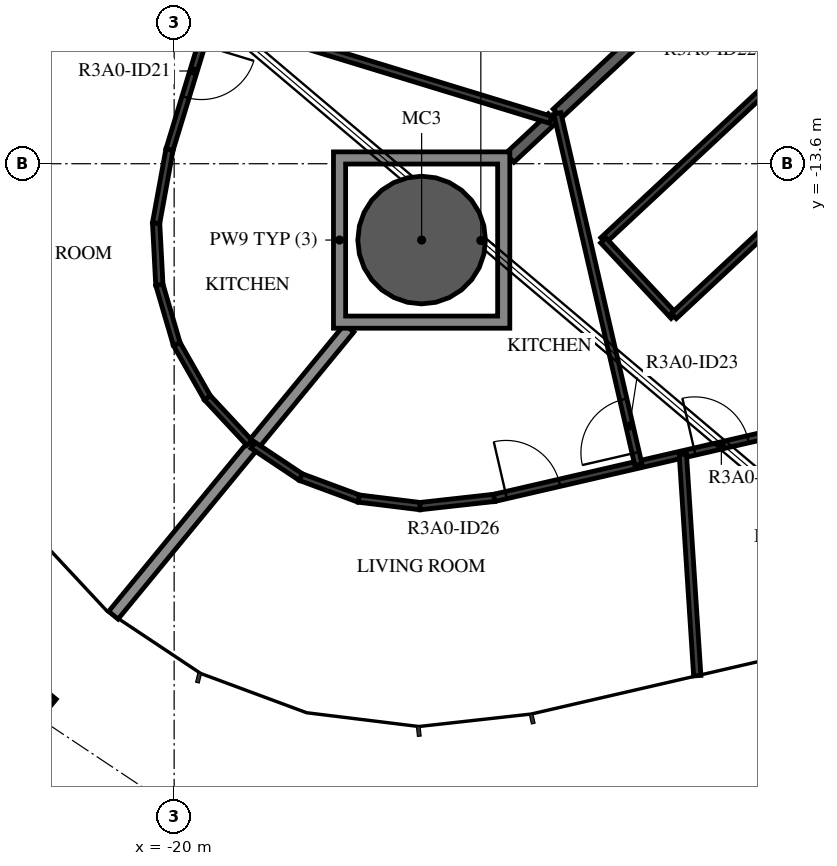
"""IFC4 building model, lengths in metres.
Left out: names, types, materials, properties, quantities, classifications, styles, units other than length and angle.
Written with IfcOpenShell. Run it as: python <this file> out.ifc"""

import sys

from ifc_helpers import new_model, si_unit, direction, frame, frame_2d, origin, origin_2d, place, context, subcontext, project, spatial, polyline, rectangle, hollow_circle, i_section, outline, extrude, element, fill, save


model = new_model("IFC4")
c1 = context("Model", 3, precision=1e-05, world=origin(), true_north=direction((0.0, 1.0)))
c2 = subcontext(c1, "Body", "Model", "MODEL_VIEW")
j1 = project(units=[si_unit("LENGTHUNIT", "METRE"), si_unit("PLANEANGLEUNIT", "RADIAN")], contexts=[c1])
p1 = place(None, origin())
s1 = spatial("IfcSite", under=j1, at=p1, CompositionType="ELEMENT")
p2 = place(p1, origin())
s2 = spatial("IfcBuilding", under=s1, at=p2, CompositionType="ELEMENT")
p3 = place(p2, frame((0.0, 0.0, 120.4)))
s3 = spatial("IfcBuildingStorey", under=s2, at=p3, CompositionType="ELEMENT", Elevation=120.4)
p4 = place(p3, frame((-15.93, -14.855, -0.38), z_axis=(0.0, 0.0, 1.0), x_axis=(1.0, 0.0, 0.0)))
e1 = element("IfcColumn", 1, at=p4, inside=s3, PredefinedType="COLUMN", context=c2, shape_type="SweptSolid", body=[
    extrude(hollow_circle(Radius=1.05, WallThickness=0.05, at=origin_2d()), origin(), (0.0, 0.0, 1.0), 3.5),
])
p5 = place(p3, frame((-22.342, -22.659, -0.38), z_axis=(0.0, 0.0, 1.0), x_axis=(-0.772637925649, 0.634846938915, 0.0)))
e2 = element("IfcColumn", 2, at=p5, inside=s3, PredefinedType="COLUMN", context=c2, shape_type="SweptSolid", body=[
    extrude(i_section(OverallWidth=0.3, OverallDepth=0.9, WebThickness=0.019, FlangeThickness=0.035, FilletRadius=0.03, at=origin_2d()), origin(), (0.0, 0.0, 1.0), 3.5),
])
p6 = place(p3, frame((-12.523, -6.659, 0.0), z_axis=(0.0, 0.0, 1.0), x_axis=(0.682001841105, -0.731350455479, 0.0)))
e3 = element("IfcWall", 3, at=p6, inside=s3, PredefinedType="STANDARD", context=c2, shape_type="SweptSolid", body=[
    extrude(rectangle(XDim=7.342, YDim=0.2, at=frame_2d((3.671, 0.0))), origin(), (0.0, 0.0, 1.0), 3.12),
])
p7 = place(p3, frame((-13.699, -12.774, 0.0), z_axis=(0.0, 0.0, 1.0), x_axis=(0.731353758457, 0.681998299111, 0.0)))
e4 = element("IfcWall", 4, at=p7, inside=s3, PredefinedType="STANDARD", context=c2, shape_type="SweptSolid", body=[
    extrude(rectangle(XDim=5.031, YDim=0.2, at=frame_2d((2.515, 0.0))), origin(), (0.0, 0.0, 1.0), 3.12),
])
p8 = place(p3, frame((-21.0, -21.025, 0.0), z_axis=(0.0, 0.0, 1.0), x_axis=(0.634846795952, 0.772638043116, 0.0)))
e5 = element("IfcWall", 5, at=p8, inside=s3, PredefinedType="STANDARD", context=c2, shape_type="SweptSolid", body=[
    extrude(rectangle(XDim=6.109, YDim=0.2, at=frame_2d((3.055, 0.0))), origin(), (0.0, 0.0, 1.0), 2.73),
])
p9 = place(p3, frame((-14.48, -13.503, 0.0), z_axis=(0.0, 0.0, 1.0), x_axis=(0.73152991834, 0.681809341806, 0.0)))
e6 = element("IfcWall", 6, at=p9, inside=s3, PredefinedType="STANDARD", context=c2, shape_type="SweptSolid", body=[
    extrude(rectangle(XDim=0.958, YDim=0.2, at=frame_2d((0.479, 0.0))), origin(), (0.0, 0.0, 1.0), 3.12),
])
p10 = place(p3, frame((-16.579, -1.928, 0.0), z_axis=(0.0, 0.0, 1.0), x_axis=(-0.29236733738, -0.956306091183, 0.0)))
e7 = element("IfcWall", 7, at=p10, inside=s3, PredefinedType="PARTITIONING", context=c2, shape_type="SweptSolid", body=[
    extrude(rectangle(XDim=11.963, YDim=0.12, at=frame_2d((5.981, 0.0))), origin(), (0.0, 0.0, 1.0), 3.12),
])
p11 = place(p10, frame((3.271, 0.0, 0.0)))
e8 = element("IfcOpeningElement", 8, at=p11, cuts=e7, PredefinedType="OPENING", context=c2, shape_type="SweptSolid", body=[
    extrude(rectangle(XDim=0.9, YDim=2.1, at=frame_2d((0.45, 1.05))), frame((0.0, 0.07, 0.0), z_axis=(0.0, -1.0, 0.0), x_axis=(1.0, 0.0, 0.0)), (0.0, 0.0, 1.0), 0.14),
])
p12 = place(p10, frame((8.229, 0.0, 0.0)))
e9 = element("IfcOpeningElement", 9, at=p12, cuts=e7, PredefinedType="OPENING", context=c2, shape_type="SweptSolid", body=[
    extrude(rectangle(XDim=0.9, YDim=2.1, at=frame_2d((0.45, 1.05))), frame((0.0, 0.07, 0.0), z_axis=(0.0, -1.0, 0.0), x_axis=(1.0, 0.0, 0.0)), (0.0, 0.0, 1.0), 0.14),
])
p13 = place(p10, frame((10.161, 0.0, 0.0)))
e10 = element("IfcOpeningElement", 10, at=p13, cuts=e7, PredefinedType="OPENING", context=c2, shape_type="SweptSolid", body=[
    extrude(rectangle(XDim=0.9, YDim=2.1, at=frame_2d((0.45, 1.05))), frame((0.0, 0.07, 0.0), z_axis=(0.0, -1.0, 0.0), x_axis=(1.0, 0.0, 0.0)), (0.0, 0.0, 1.0), 0.14),
])
p14 = place(p3, frame((-19.404, -11.167, 0.0), z_axis=(0.0, 0.0, 1.0), x_axis=(0.956314306829, -0.292340463423, 0.0)))
e11 = element("IfcWall", 11, at=p14, inside=s3, PredefinedType="PARTITIONING", context=c2, shape_type="SweptSolid", body=[
    extrude(rectangle(XDim=5.85, YDim=0.12, at=frame_2d((2.925, 0.0))), origin(), (0.0, 0.0, 1.0), 3.12),
])
p15 = place(p14, frame((0.3, 0.0, 0.0)))
e12 = element("IfcOpeningElement", 12, at=p15, cuts=e11, PredefinedType="OPENING", context=c2, shape_type="SweptSolid", body=[
    extrude(rectangle(XDim=0.9, YDim=2.1, at=frame_2d((0.45, 1.05))), frame((0.0, 0.07, 0.0), z_axis=(0.0, -1.0, 0.0), x_axis=(1.0, 0.0, 0.0)), (0.0, 0.0, 1.0), 0.14),
])
for number, where, z_axis, x_axis in (
    (13, (-18.762, -18.19, 0.0), (0.0, 0.0, 1.0), (-0.682, 0.731, 0.0)),
    (14, (-19.455, -17.448, 0.0), (0.0, 0.0, 1.0), (-0.495, 0.869, 0.0)),
    (15, (-19.958, -16.565, 0.0), (0.0, 0.0, 1.0), (-0.281, 0.96, 0.0)),
):
    element("IfcWall", number, at=place(p3, frame(where, z_axis=z_axis, x_axis=x_axis)), inside=s3, PredefinedType="PARTITIONING", context=c2, shape_type="SweptSolid", body=[
        extrude(rectangle(XDim=1.016, YDim=0.12, at=frame_2d((0.508, 0.0))), origin(), (0.0, 0.0, 1.0), 3.12),
    ])
p16 = place(p3, frame((-20.244, -15.59, 0.0), z_axis=(0.0, 0.0, 1.0), x_axis=(-0.052142637988, 0.998639647372, 0.0)))
e16 = element("IfcWall", 16, at=p16, inside=s3, PredefinedType="PARTITIONING", context=c2, shape_type="SweptSolid", body=[
    extrude(rectangle(XDim=1.016, YDim=0.12, at=frame_2d((0.508, 0.0))), origin(), (0.0, 0.0, 1.0), 3.12),
])
p17 = place(p3, frame((-20.297, -14.575, 0.0), z_axis=(0.0, 0.0, 1.0), x_axis=(0.179288174895, 0.983796600087, 0.0)))
e17 = element("IfcWall", 17, at=p17, inside=s3, PredefinedType="PARTITIONING", context=c2, shape_type="SweptSolid", body=[
    extrude(rectangle(XDim=1.227, YDim=0.12, at=frame_2d((0.613, 0.0))), origin(), (0.0, 0.0, 1.0), 3.12),
])
p18 = place(p3, frame((-11.117, -10.366, 0.0), z_axis=(0.0, 0.0, 1.0), x_axis=(0.682041233274, -0.731313719353, 0.0)))
e18 = element("IfcWall", 18, at=p18, inside=s3, PredefinedType="PARTITIONING", context=c2, shape_type="SweptSolid", body=[
    extrude(rectangle(XDim=2.042, YDim=0.12, at=frame_2d((1.021, 0.0))), origin(), (0.0, 0.0, 1.0), 3.12),
])
p19 = place(p18, frame((0.2, 0.0, 0.0)))
e19 = element("IfcOpeningElement", 19, at=p19, cuts=e18, PredefinedType="OPENING", context=c2, shape_type="SweptSolid", body=[
    extrude(rectangle(XDim=0.9, YDim=2.1, at=frame_2d((0.45, 1.05))), frame((0.0, 0.07, 0.0), z_axis=(0.0, -1.0, 0.0), x_axis=(1.0, 0.0, 0.0)), (0.0, 0.0, 1.0), 0.14),
])
p20 = place(p3, frame((-9.724, -11.859, 0.0), z_axis=(0.0, 0.0, 1.0), x_axis=(-0.731365154613, -0.681986078023, 0.0)))
e20 = element("IfcWall", 20, at=p20, inside=s3, PredefinedType="PARTITIONING", context=c2, shape_type="SweptSolid", body=[
    extrude(rectangle(XDim=4.4, YDim=0.12, at=frame_2d((2.2, 0.0))), origin(), (0.0, 0.0, 1.0), 3.12),
])
p21 = place(p3, frame((-12.943, -14.86, 0.0), z_axis=(0.0, 0.0, 1.0), x_axis=(0.682046998737, -0.731308342297, 0.0)))
e21 = element("IfcWall", 21, at=p21, inside=s3, PredefinedType="PARTITIONING", context=c2, shape_type="SweptSolid", body=[
    extrude(rectangle(XDim=1.7, YDim=0.12, at=frame_2d((0.85, 0.0))), origin(), (0.0, 0.0, 1.0), 3.12),
])
p22 = place(p3, frame((-11.783, -16.104, 0.0), z_axis=(0.0, 0.0, 1.0), x_axis=(0.731365154613, 0.681986078023, 0.0)))
e22 = element("IfcWall", 22, at=p22, inside=s3, PredefinedType="PARTITIONING", context=c2, shape_type="SweptSolid", body=[
    extrude(rectangle(XDim=4.4, YDim=0.12, at=frame_2d((2.2, 0.0))), origin(), (0.0, 0.0, 1.0), 3.12),
])
p23 = place(p3, frame((-18.703, -18.23, 0.0), z_axis=(0.0, 0.0, 1.0), x_axis=(0.832328473933, -0.554282699965, 0.0)))
e23 = element("IfcWall", 23, at=p23, inside=s3, PredefinedType="PARTITIONING", context=c2, shape_type="SweptSolid", body=[
    extrude(rectangle(XDim=0.945, YDim=0.12, at=frame_2d((0.472, 0.0))), origin(), (0.0, 0.0, 1.0), 3.12),
])
p24 = place(p3, frame((-17.917, -18.754, 0.0), z_axis=(0.0, 0.0, 1.0), x_axis=(0.937684971769, -0.347486537462, 0.0)))
e24 = element("IfcWall", 24, at=p24, inside=s3, PredefinedType="PARTITIONING", context=c2, shape_type="SweptSolid", body=[
    extrude(rectangle(XDim=1.016, YDim=0.12, at=frame_2d((0.508, 0.0))), origin(), (0.0, 0.0, 1.0), 3.12),
])
p25 = place(p3, frame((-16.964, -19.107, 0.0), z_axis=(0.0, 0.0, 1.0), x_axis=(0.992523553766, -0.122053247474, 0.0)))
e25 = element("IfcWall", 25, at=p25, inside=s3, PredefinedType="PARTITIONING", context=c2, shape_type="SweptSolid", body=[
    extrude(rectangle(XDim=1.016, YDim=0.12, at=frame_2d((0.508, 0.0))), origin(), (0.0, 0.0, 1.0), 3.12),
])
p26 = place(p3, frame((-15.956, -19.231, 0.0), z_axis=(0.0, 0.0, 1.0), x_axis=(0.993883734674, 0.110431526075, 0.0)))
e26 = element("IfcWall", 26, at=p26, inside=s3, PredefinedType="PARTITIONING", context=c2, shape_type="SweptSolid", body=[
    extrude(rectangle(XDim=1.227, YDim=0.12, at=frame_2d((0.614, 0.0))), origin(), (0.0, 0.0, 1.0), 3.12),
])
p27 = place(p3, frame((-14.736, -19.095, 0.0), z_axis=(0.0, 0.0, 1.0), x_axis=(0.974369132722, 0.224955091516, 0.0)))
e27 = element("IfcWall", 27, at=p27, inside=s3, PredefinedType="PARTITIONING", context=c2, shape_type="SweptSolid", body=[
    extrude(rectangle(XDim=18.654, YDim=0.12, at=frame_2d((9.327, 0.0))), origin(), (0.0, 0.0, 1.0), 3.12),
])
p28 = place(p27, frame((3.383, 0.0, 0.0)))
e28 = element("IfcOpeningElement", 28, at=p28, cuts=e27, PredefinedType="OPENING", context=c2, shape_type="SweptSolid", body=[
    extrude(rectangle(XDim=0.9, YDim=2.1, at=frame_2d((0.45, 1.05))), frame((0.0, 0.07, 0.0), z_axis=(0.0, -1.0, 0.0), x_axis=(1.0, 0.0, 0.0)), (0.0, 0.0, 1.0), 0.14),
])
p29 = place(p27, frame((6.81, 0.0, 0.0)))
e29 = element("IfcOpeningElement", 29, at=p29, cuts=e27, PredefinedType="OPENING", context=c2, shape_type="SweptSolid", body=[
    extrude(rectangle(XDim=0.9, YDim=2.1, at=frame_2d((0.45, 1.05))), frame((0.0, 0.07, 0.0), z_axis=(0.0, -1.0, 0.0), x_axis=(1.0, 0.0, 0.0)), (0.0, 0.0, 1.0), 0.14),
])
p30 = place(p27, frame((0.2, 0.0, 0.0)))
e30 = element("IfcOpeningElement", 30, at=p30, cuts=e27, PredefinedType="OPENING", context=c2, shape_type="SweptSolid", body=[
    extrude(rectangle(XDim=0.9, YDim=2.1, at=frame_2d((0.45, 1.05))), frame((0.0, 0.07, 0.0), z_axis=(0.0, -1.0, 0.0), x_axis=(1.0, 0.0, 0.0)), (0.0, 0.0, 1.0), 0.14),
])
p31 = place(p27, frame((14.839, 0.0, 0.0)))
e31 = element("IfcOpeningElement", 31, at=p31, cuts=e27, PredefinedType="OPENING", context=c2, shape_type="SweptSolid", body=[
    extrude(rectangle(XDim=0.9, YDim=2.1, at=frame_2d((0.45, 1.05))), frame((0.0, 0.07, 0.0), z_axis=(0.0, -1.0, 0.0), x_axis=(1.0, 0.0, 0.0)), (0.0, 0.0, 1.0), 0.14),
])
p32 = place(p3, frame((-12.366, -18.548, 0.0), z_axis=(0.0, 0.0, 1.0), x_axis=(-0.224958805164, 0.974368275335, 0.0)))
e32 = element("IfcWall", 32, at=p32, inside=s3, PredefinedType="PARTITIONING", context=c2, shape_type="SweptSolid", body=[
    extrude(rectangle(XDim=5.926, YDim=0.12, at=frame_2d((2.963, 0.0))), origin(), (0.0, 0.0, 1.0), 3.12),
])
p33 = place(p32, frame((0.2, 0.0, 0.0)))
e33 = element("IfcOpeningElement", 33, at=p33, cuts=e32, PredefinedType="OPENING", context=c2, shape_type="SweptSolid", body=[
    extrude(rectangle(XDim=0.9, YDim=2.1, at=frame_2d((0.45, 1.05))), frame((0.0, 0.07, 0.0), z_axis=(0.0, -1.0, 0.0), x_axis=(1.0, 0.0, 0.0)), (0.0, 0.0, 1.0), 0.14),
])
p34 = place(p3, frame((-11.397, -22.019, 0.0), z_axis=(0.0, 0.0, 1.0), x_axis=(-0.065124052048, 0.997877175731, 0.0)))
e34 = element("IfcWall", 34, at=p34, inside=s3, PredefinedType="PARTITIONING", context=c2, shape_type="SweptSolid", body=[
    extrude(rectangle(XDim=3.648, YDim=0.12, at=frame_2d((1.824, 0.0))), origin(), (0.0, 0.0, 1.0), 3.12),
])
p35 = place(p3, origin())
e35 = element("IfcWall", 35, at=p35, inside=s3, PredefinedType="STANDARD", context=c2, shape_type="SweptSolid", body=[
    extrude(outline(polyline([(-14.48, -13.405), (-14.48, -16.305), (-17.38, -16.305), (-17.38, -13.405), (-14.48, -13.405)]), holes=[polyline([(-17.18, -16.105), (-14.68, -16.105), (-14.68, -13.605), (-17.18, -13.605), (-17.18, -16.105)])]), origin(), (0.0, 0.0, 1.0), 3.12),
])
p36 = place(p13, origin())
e36 = element("IfcDoor", 36, at=p36, inside=s3, OperationType="SINGLE_SWING_LEFT", PredefinedType="DOOR", context=c2, shape_type="SweptSolid", body=[
    extrude(rectangle(XDim=0.9, YDim=2.1, at=frame_2d((0.45, 1.05))), frame((0.0, 0.025, 0.0), z_axis=(0.0, -1.0, 0.0), x_axis=(1.0, 0.0, 0.0)), (0.0, 0.0, 1.0), 0.05),
])
fill(e10, e36)
p37 = place(p33, origin())
e37 = element("IfcDoor", 37, at=p37, inside=s3, OperationType="SINGLE_SWING_LEFT", PredefinedType="DOOR", context=c2, shape_type="SweptSolid", body=[
    extrude(rectangle(XDim=0.9, YDim=2.1, at=frame_2d((0.45, 1.05))), frame((0.0, 0.025, 0.0), z_axis=(0.0, -1.0, 0.0), x_axis=(1.0, 0.0, 0.0)), (0.0, 0.0, 1.0), 0.05),
])
fill(e33, e37)
p38 = place(p28, origin())
e38 = element("IfcDoor", 38, at=p38, inside=s3, OperationType="SINGLE_SWING_LEFT", PredefinedType="DOOR", context=c2, shape_type="SweptSolid", body=[
    extrude(rectangle(XDim=0.9, YDim=2.1, at=frame_2d((0.45, 1.05))), frame((0.0, 0.025, 0.0), z_axis=(0.0, -1.0, 0.0), x_axis=(1.0, 0.0, 0.0)), (0.0, 0.0, 1.0), 0.05),
])
fill(e28, e38)
p39 = place(p30, origin())
e39 = element("IfcDoor", 39, at=p39, inside=s3, OperationType="SINGLE_SWING_RIGHT", PredefinedType="DOOR", context=c2, shape_type="SweptSolid", body=[
    extrude(rectangle(XDim=0.9, YDim=2.1, at=frame_2d((0.45, 1.05))), frame((0.0, 0.025, 0.0), z_axis=(0.0, -1.0, 0.0), x_axis=(1.0, 0.0, 0.0)), (0.0, 0.0, 1.0), 0.05),
])
fill(e30, e39)
save(model, sys.argv[1])
